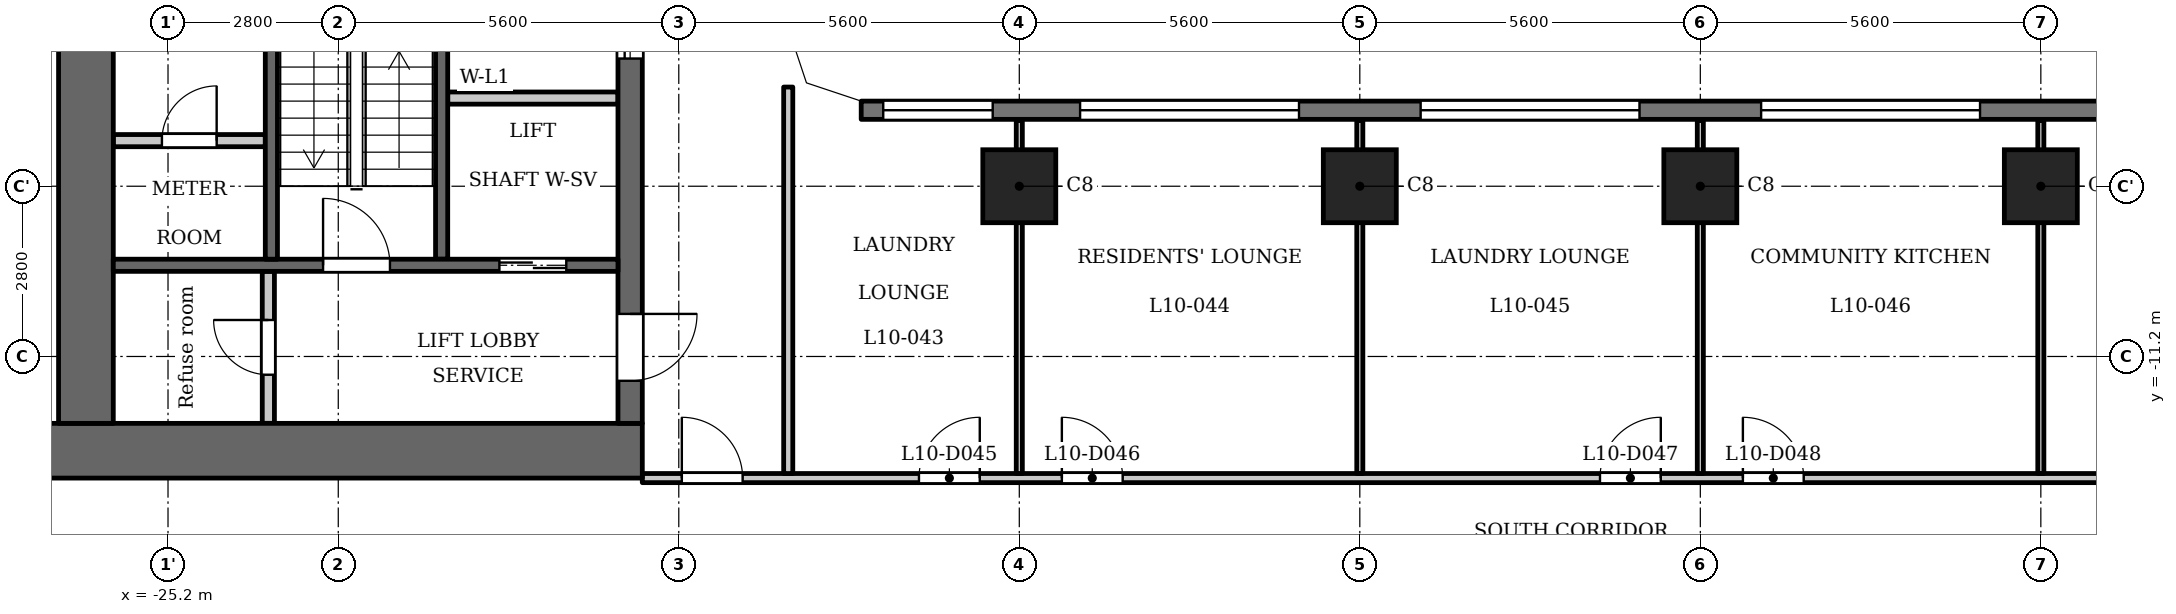
"""IFC4 building model, lengths in metres.
Left out: names, types, materials, properties, quantities, classifications, styles, units other than length and angle.
Written with IfcOpenShell. Run it as: python <this file> out.ifc"""

import sys

from ifc_helpers import new_model, si_unit, direction, frame, frame_2d, origin, origin_2d, place, context, subcontext, project, spatial, polyline, rectangle, outline, extrude, element, fill, save


model = new_model("IFC4")
c1 = context("Model", 3, precision=1e-05, world=origin(), true_north=direction((0.0, 1.0)))
c2 = subcontext(c1, "Body", "Model", "MODEL_VIEW")
j1 = project(units=[si_unit("LENGTHUNIT", "METRE"), si_unit("PLANEANGLEUNIT", "RADIAN")], contexts=[c1])
p1 = place(None, origin())
s1 = spatial("IfcSite", under=j1, at=p1, CompositionType="ELEMENT")
p2 = place(p1, origin())
s2 = spatial("IfcBuilding", under=s1, at=p2, CompositionType="ELEMENT")
p3 = place(p2, frame((0.0, 0.0, 44.5)))
s3 = spatial("IfcBuildingStorey", under=s2, at=p3, CompositionType="ELEMENT", Elevation=44.5)
for number, where, z_axis, x_axis in (
    (1, (-11.2, -8.4, 0.0), (0.0, 0.0, 1.0), (1.0, 0.0, 0.0)),
    (2, (-5.6, -8.4, 0.0), (0.0, 0.0, 1.0), (1.0, 0.0, 0.0)),
    (3, (0.0, -8.4, 0.0), (0.0, 0.0, 1.0), (1.0, 0.0, 0.0)),
    (4, (5.6, -8.4, 0.0), (0.0, 0.0, 1.0), (1.0, 0.0, 0.0)),
):
    element("IfcColumn", number, at=place(p3, frame(where, z_axis=z_axis, x_axis=x_axis)), inside=s3, PredefinedType="COLUMN", context=c2, shape_type="SweptSolid", body=[
        extrude(rectangle(XDim=1.2, YDim=1.2, at=origin_2d()), origin(), (0.0, 0.0, 1.0), 3.5),
    ])
p4 = place(p3, frame((13.8, -7.15, 0.0), z_axis=(0.0, 0.0, 1.0), x_axis=(-1.0, 0.0, 0.0)))
e5 = element("IfcWall", 5, at=p4, inside=s3, PredefinedType="SOLIDWALL", context=c2, shape_type="SweptSolid", body=[
    extrude(rectangle(XDim=27.6, YDim=0.3, at=frame_2d((13.8, 0.0))), origin(), (0.0, 0.0, 1.0), 3.2),
])
p5 = place(p4, frame((0.363, 0.0, 0.9)))
e6 = element("IfcOpeningElement", 6, at=p5, cuts=e5, PredefinedType="OPENING", context=c2, shape_type="SweptSolid", body=[
    extrude(rectangle(XDim=1.8, YDim=1.25, at=frame_2d((0.9, 0.625))), frame((0.0, 0.16, 0.0), z_axis=(0.0, -1.0, 0.0), x_axis=(1.0, 0.0, 0.0)), (0.0, 0.0, 1.0), 0.32),
])
p6 = place(p4, frame((3.6, 0.0, 1.2)))
e7 = element("IfcOpeningElement", 7, at=p6, cuts=e5, PredefinedType="OPENING", context=c2, shape_type="SweptSolid", body=[
    extrude(rectangle(XDim=3.6, YDim=0.95, at=frame_2d((1.8, 0.475))), frame((0.0, 0.16, 0.0), z_axis=(0.0, -1.0, 0.0), x_axis=(1.0, 0.0, 0.0)), (0.0, 0.0, 1.0), 0.32),
])
p7 = place(p4, frame((9.2, 0.0, 1.2)))
e8 = element("IfcOpeningElement", 8, at=p7, cuts=e5, PredefinedType="OPENING", context=c2, shape_type="SweptSolid", body=[
    extrude(rectangle(XDim=3.6, YDim=0.95, at=frame_2d((1.8, 0.475))), frame((0.0, 0.16, 0.0), z_axis=(0.0, -1.0, 0.0), x_axis=(1.0, 0.0, 0.0)), (0.0, 0.0, 1.0), 0.32),
])
p8 = place(p4, frame((14.8, 0.0, 1.2)))
e9 = element("IfcOpeningElement", 9, at=p8, cuts=e5, PredefinedType="OPENING", context=c2, shape_type="SweptSolid", body=[
    extrude(rectangle(XDim=3.6, YDim=0.95, at=frame_2d((1.8, 0.475))), frame((0.0, 0.16, 0.0), z_axis=(0.0, -1.0, 0.0), x_axis=(1.0, 0.0, 0.0)), (0.0, 0.0, 1.0), 0.32),
])
p9 = place(p4, frame((20.4, 0.0, 1.2)))
e10 = element("IfcOpeningElement", 10, at=p9, cuts=e5, PredefinedType="OPENING", context=c2, shape_type="SweptSolid", body=[
    extrude(rectangle(XDim=3.6, YDim=0.95, at=frame_2d((1.8, 0.475))), frame((0.0, 0.16, 0.0), z_axis=(0.0, -1.0, 0.0), x_axis=(1.0, 0.0, 0.0)), (0.0, 0.0, 1.0), 0.32),
])
p10 = place(p4, frame((25.438, 0.0, 0.9)))
e11 = element("IfcOpeningElement", 11, at=p10, cuts=e5, PredefinedType="OPENING", context=c2, shape_type="SweptSolid", body=[
    extrude(rectangle(XDim=1.8, YDim=1.25, at=frame_2d((0.9, 0.625))), frame((0.0, 0.16, 0.0), z_axis=(0.0, -1.0, 0.0), x_axis=(1.0, 0.0, 0.0)), (0.0, 0.0, 1.0), 0.32),
])
p11 = place(p3, frame((-20.7, -9.6, 0.0), z_axis=(0.0, 0.0, 1.0), x_axis=(0.0, 1.0, 0.0)))
e12 = element("IfcWall", 12, at=p11, inside=s3, PredefinedType="SHEAR", context=c2, shape_type="SweptSolid", body=[
    extrude(rectangle(XDim=9.75, YDim=0.2, at=frame_2d((4.875, 0.0))), origin(), (0.0, 0.0, 1.0), 3.2),
])
p12 = place(p3, frame((-17.4, -12.75, 0.0), z_axis=(0.0, 0.0, 1.0), x_axis=(-1.0, 0.0, 0.0)))
e13 = element("IfcWall", 13, at=p12, inside=s3, PredefinedType="SHEAR", context=c2, shape_type="SweptSolid", body=[
    extrude(rectangle(XDim=10.4, YDim=0.9, at=frame_2d((5.2, 0.0))), origin(), (0.0, 0.0, 1.0), 3.2),
])
p13 = place(p3, frame((-17.6, -12.3, 0.0), z_axis=(0.0, 0.0, 1.0), x_axis=(0.0, 1.0, 0.0)))
e14 = element("IfcWall", 14, at=p13, inside=s3, PredefinedType="SHEAR", context=c2, shape_type="SweptSolid", body=[
    extrude(rectangle(XDim=24.6, YDim=0.4, at=frame_2d((12.3, 0.0))), origin(), (0.0, 0.0, 1.0), 3.2),
])
p14 = place(p13, frame((6.0, 0.0, 0.0)))
e15 = element("IfcOpeningElement", 15, at=p14, cuts=e14, PredefinedType="OPENING", context=c2, shape_type="SweptSolid", body=[
    extrude(rectangle(XDim=1.1, YDim=2.1, at=frame_2d((0.55, 1.05))), frame((0.0, 0.21, 0.0), z_axis=(0.0, -1.0, 0.0), x_axis=(1.0, 0.0, 0.0)), (0.0, 0.0, 1.0), 0.42),
])
p15 = place(p13, frame((8.4, 0.0, 0.0)))
e16 = element("IfcOpeningElement", 16, at=p15, cuts=e14, PredefinedType="OPENING", context=c2, shape_type="SweptSolid", body=[
    extrude(rectangle(XDim=1.1, YDim=2.1, at=frame_2d((0.55, 1.05))), frame((0.0, 0.21, 0.0), z_axis=(0.0, -1.0, 0.0), x_axis=(1.0, 0.0, 0.0)), (0.0, 0.0, 1.0), 0.42),
])
p16 = place(p13, frame((10.8, 0.0, 0.0)))
e17 = element("IfcOpeningElement", 17, at=p16, cuts=e14, PredefinedType="OPENING", context=c2, shape_type="SweptSolid", body=[
    extrude(rectangle(XDim=1.1, YDim=2.1, at=frame_2d((0.55, 1.05))), frame((0.0, 0.21, 0.0), z_axis=(0.0, -1.0, 0.0), x_axis=(1.0, 0.0, 0.0)), (0.0, 0.0, 1.0), 0.42),
])
p17 = place(p13, frame((16.75, 0.0, 0.0)))
e18 = element("IfcOpeningElement", 18, at=p17, cuts=e14, PredefinedType="OPENING", context=c2, shape_type="SweptSolid", body=[
    extrude(rectangle(XDim=0.9, YDim=2.1, at=frame_2d((0.45, 1.05))), frame((0.0, 0.21, 0.0), z_axis=(0.0, -1.0, 0.0), x_axis=(1.0, 0.0, 0.0)), (0.0, 0.0, 1.0), 0.42),
])
p18 = place(p13, frame((22.8, 0.0, 0.0)))
e19 = element("IfcOpeningElement", 19, at=p18, cuts=e14, PredefinedType="OPENING", context=c2, shape_type="SweptSolid", body=[
    extrude(rectangle(XDim=1.1, YDim=2.1, at=frame_2d((0.55, 1.05))), frame((0.0, 0.21, 0.0), z_axis=(0.0, -1.0, 0.0), x_axis=(1.0, 0.0, 0.0)), (0.0, 0.0, 1.0), 0.42),
])
p19 = place(p13, frame((0.7, 0.0, 0.0)))
e20 = element("IfcOpeningElement", 20, at=p19, cuts=e14, PredefinedType="OPENING", context=c2, shape_type="SweptSolid", body=[
    extrude(rectangle(XDim=1.1, YDim=2.1, at=frame_2d((0.55, 1.05))), frame((0.0, 0.21, 0.0), z_axis=(0.0, -1.0, 0.0), x_axis=(1.0, 0.0, 0.0)), (0.0, 0.0, 1.0), 0.42),
])
p20 = place(p13, frame((12.775, 0.0, 0.0)))
e21 = element("IfcOpeningElement", 21, at=p20, cuts=e14, PredefinedType="OPENING", context=c2, shape_type="SweptSolid", body=[
    extrude(rectangle(XDim=1.8, YDim=2.1, at=frame_2d((0.9, 1.05))), frame((0.0, 0.21, 0.0), z_axis=(0.0, -1.0, 0.0), x_axis=(1.0, 0.0, 0.0)), (0.0, 0.0, 1.0), 0.42),
])
p21 = place(p3, frame((-26.55, -12.3, 0.0), z_axis=(0.0, 0.0, 1.0), x_axis=(0.0, 1.0, 0.0)))
e22 = element("IfcWall", 22, at=p21, inside=s3, PredefinedType="SHEAR", context=c2, shape_type="SweptSolid", body=[
    extrude(rectangle(XDim=24.6, YDim=0.9, at=frame_2d((12.3, 0.0))), origin(), (0.0, 0.0, 1.0), 3.2),
])
p22 = place(p3, frame((-23.55, -12.3, 0.0), z_axis=(0.0, 0.0, 1.0), x_axis=(0.0, 1.0, 0.0)))
e23 = element("IfcWall", 23, at=p22, inside=s3, PredefinedType="PARTITIONING", context=c2, shape_type="SweptSolid", body=[
    extrude(rectangle(XDim=2.5, YDim=0.2, at=frame_2d((1.25, 0.0))), origin(), (0.0, 0.0, 1.0), 3.2),
])
p23 = place(p22, frame((0.8, 0.0, 0.0)))
e24 = element("IfcOpeningElement", 24, at=p23, cuts=e23, PredefinedType="OPENING", context=c2, shape_type="SweptSolid", body=[
    extrude(rectangle(XDim=0.9, YDim=2.1, at=frame_2d((0.45, 1.05))), frame((0.0, 0.11, 0.0), z_axis=(0.0, -1.0, 0.0), x_axis=(1.0, 0.0, 0.0)), (0.0, 0.0, 1.0), 0.22),
])
p24 = place(p3, frame((-23.6, -7.65, 0.0), z_axis=(0.0, 0.0, 1.0), x_axis=(-1.0, 0.0, 0.0)))
e25 = element("IfcWall", 25, at=p24, inside=s3, PredefinedType="PARTITIONING", context=c2, shape_type="SweptSolid", body=[
    extrude(rectangle(XDim=2.5, YDim=0.2, at=frame_2d((1.25, 0.0))), origin(), (0.0, 0.0, 1.0), 3.2),
])
p25 = place(p24, frame((0.8, 0.0, 0.0)))
e26 = element("IfcOpeningElement", 26, at=p25, cuts=e25, PredefinedType="OPENING", context=c2, shape_type="SweptSolid", body=[
    extrude(rectangle(XDim=0.9, YDim=2.1, at=frame_2d((0.45, 1.05))), frame((0.0, 0.11, 0.0), z_axis=(0.0, -1.0, 0.0), x_axis=(1.0, 0.0, 0.0)), (0.0, 0.0, 1.0), 0.22),
])
p26 = place(p3, frame((-17.8, -9.7, 0.0), z_axis=(0.0, 0.0, 1.0), x_axis=(-1.0, 0.0, 0.0)))
e27 = element("IfcWall", 27, at=p26, inside=s3, PredefinedType="SHEAR", context=c2, shape_type="SweptSolid", body=[
    extrude(rectangle(XDim=8.3, YDim=0.2, at=frame_2d((4.15, 0.0))), origin(), (0.0, 0.0, 1.0), 3.2),
])
p27 = place(p26, frame((0.85, 0.0, 0.0)))
e28 = element("IfcOpeningElement", 28, at=p27, cuts=e27, PredefinedType="OPENING", context=c2, shape_type="SweptSolid", body=[
    extrude(rectangle(XDim=1.1, YDim=2.1, at=frame_2d((0.55, 1.05))), frame((0.0, 0.11, 0.0), z_axis=(0.0, -1.0, 0.0), x_axis=(1.0, 0.0, 0.0)), (0.0, 0.0, 1.0), 0.22),
])
p28 = place(p26, frame((3.75, 0.0, 0.0)))
e29 = element("IfcOpeningElement", 29, at=p28, cuts=e27, PredefinedType="OPENING", context=c2, shape_type="SweptSolid", body=[
    extrude(rectangle(XDim=1.1, YDim=2.1, at=frame_2d((0.55, 1.05))), frame((0.0, 0.11, 0.0), z_axis=(0.0, -1.0, 0.0), x_axis=(1.0, 0.0, 0.0)), (0.0, 0.0, 1.0), 0.22),
])
p29 = place(p3, frame((-17.8, -6.95, 0.0), z_axis=(0.0, 0.0, 1.0), x_axis=(-1.0, 0.0, 0.0)))
e30 = element("IfcWall", 30, at=p29, inside=s3, PredefinedType="PARTITIONING", context=c2, shape_type="SweptSolid", body=[
    extrude(rectangle(XDim=2.8, YDim=0.2, at=frame_2d((1.4, 0.0))), origin(), (0.0, 0.0, 1.0), 3.2),
])
p30 = place(p3, frame((-23.5, -9.6, 0.0), z_axis=(0.0, 0.0, 1.0), x_axis=(0.0, 1.0, 0.0)))
e31 = element("IfcWall", 31, at=p30, inside=s3, PredefinedType="SHEAR", context=c2, shape_type="SweptSolid", body=[
    extrude(rectangle(XDim=6.9, YDim=0.2, at=frame_2d((3.45, 0.0))), origin(), (0.0, 0.0, 1.0), 3.2),
])
p31 = place(p3, frame((-17.4, -13.2, 0.0), z_axis=(0.0, 0.0, 1.0), x_axis=(1.0, 0.0, 0.0)))
e32 = element("IfcWall", 32, at=p31, inside=s3, PredefinedType="PARTITIONING", context=c2, shape_type="SweptSolid", body=[
    extrude(rectangle(XDim=34.8, YDim=0.15, at=frame_2d((17.4, 0.0))), origin(), (0.0, 0.0, 1.0), 3.2),
])
p32 = place(p31, frame((0.65, 0.0, 0.0)))
e33 = element("IfcOpeningElement", 33, at=p32, cuts=e32, PredefinedType="OPENING", context=c2, shape_type="SweptSolid", body=[
    extrude(rectangle(XDim=1.0, YDim=2.1, at=frame_2d((0.5, 1.05))), frame((0.0, 0.085, 0.0), z_axis=(0.0, -1.0, 0.0), x_axis=(1.0, 0.0, 0.0)), (0.0, 0.0, 1.0), 0.17),
])
p33 = place(p31, frame((33.05, 0.0, 0.0)))
e34 = element("IfcOpeningElement", 34, at=p33, cuts=e32, PredefinedType="OPENING", context=c2, shape_type="SweptSolid", body=[
    extrude(rectangle(XDim=1.0, YDim=2.1, at=frame_2d((0.5, 1.05))), frame((0.0, 0.085, 0.0), z_axis=(0.0, -1.0, 0.0), x_axis=(1.0, 0.0, 0.0)), (0.0, 0.0, 1.0), 0.17),
])
p34 = place(p31, frame((4.55, 0.0, 0.0)))
e35 = element("IfcOpeningElement", 35, at=p34, cuts=e32, PredefinedType="OPENING", context=c2, shape_type="SweptSolid", body=[
    extrude(rectangle(XDim=1.0, YDim=2.1, at=frame_2d((0.5, 1.05))), frame((0.0, 0.085, 0.0), z_axis=(0.0, -1.0, 0.0), x_axis=(1.0, 0.0, 0.0)), (0.0, 0.0, 1.0), 0.17),
])
p35 = place(p31, frame((6.9, 0.0, 0.0)))
e36 = element("IfcOpeningElement", 36, at=p35, cuts=e32, PredefinedType="OPENING", context=c2, shape_type="SweptSolid", body=[
    extrude(rectangle(XDim=1.0, YDim=2.1, at=frame_2d((0.5, 1.05))), frame((0.0, 0.085, 0.0), z_axis=(0.0, -1.0, 0.0), x_axis=(1.0, 0.0, 0.0)), (0.0, 0.0, 1.0), 0.17),
])
p36 = place(p31, frame((15.75, 0.0, 0.0)))
e37 = element("IfcOpeningElement", 37, at=p36, cuts=e32, PredefinedType="OPENING", context=c2, shape_type="SweptSolid", body=[
    extrude(rectangle(XDim=1.0, YDim=2.1, at=frame_2d((0.5, 1.05))), frame((0.0, 0.085, 0.0), z_axis=(0.0, -1.0, 0.0), x_axis=(1.0, 0.0, 0.0)), (0.0, 0.0, 1.0), 0.17),
])
p37 = place(p31, frame((18.1, 0.0, 0.0)))
e38 = element("IfcOpeningElement", 38, at=p37, cuts=e32, PredefinedType="OPENING", context=c2, shape_type="SweptSolid", body=[
    extrude(rectangle(XDim=1.0, YDim=2.1, at=frame_2d((0.5, 1.05))), frame((0.0, 0.085, 0.0), z_axis=(0.0, -1.0, 0.0), x_axis=(1.0, 0.0, 0.0)), (0.0, 0.0, 1.0), 0.17),
])
p38 = place(p31, frame((26.95, 0.0, 0.0)))
e39 = element("IfcOpeningElement", 39, at=p38, cuts=e32, PredefinedType="OPENING", context=c2, shape_type="SweptSolid", body=[
    extrude(rectangle(XDim=1.0, YDim=2.1, at=frame_2d((0.5, 1.05))), frame((0.0, 0.085, 0.0), z_axis=(0.0, -1.0, 0.0), x_axis=(1.0, 0.0, 0.0)), (0.0, 0.0, 1.0), 0.17),
])
p39 = place(p31, frame((29.25, 0.0, 0.0)))
e40 = element("IfcOpeningElement", 40, at=p39, cuts=e32, PredefinedType="OPENING", context=c2, shape_type="SweptSolid", body=[
    extrude(rectangle(XDim=1.0, YDim=2.1, at=frame_2d((0.5, 1.05))), frame((0.0, 0.085, 0.0), z_axis=(0.0, -1.0, 0.0), x_axis=(1.0, 0.0, 0.0)), (0.0, 0.0, 1.0), 0.17),
])
p40 = place(p3, frame((-15.0, -13.125, 0.0), z_axis=(0.0, 0.0, 1.0), x_axis=(0.0, 1.0, 0.0)))
e41 = element("IfcWall", 41, at=p40, inside=s3, PredefinedType="PARTITIONING", context=c2, shape_type="SweptSolid", body=[
    extrude(rectangle(XDim=6.356, YDim=0.15, at=frame_2d((3.178, 0.0))), origin(), (0.0, 0.0, 1.0), 3.2),
])
for number, where, z_axis, x_axis in (
    (42, (-11.2, -13.125, 0.0), (0.0, 0.0, 1.0), (0.0, 1.0, 0.0)),
    (43, (-5.6, -13.125, 0.0), (0.0, 0.0, 1.0), (0.0, 1.0, 0.0)),
    (44, (0.0, -13.125, 0.0), (0.0, 0.0, 1.0), (0.0, 1.0, 0.0)),
    (45, (5.6, -13.125, 0.0), (0.0, 0.0, 1.0), (0.0, 1.0, 0.0)),
):
    element("IfcWall", number, at=place(p3, frame(where, z_axis=z_axis, x_axis=x_axis)), inside=s3, PredefinedType="PARTITIONING", context=c2, shape_type="SweptSolid", body=[
        extrude(rectangle(XDim=5.805, YDim=0.1, at=frame_2d((2.902, 0.0))), origin(), (0.0, 0.0, 1.0), 3.2),
    ])
p41 = place(p3, origin())
e46 = element("IfcWall", 46, at=p41, inside=s3, PredefinedType="SOLIDWALL", context=c2, shape_type="SweptSolid", body=[
    extrude(outline(polyline([(-14.937, -6.937), (-13.849, -7.3), (-13.8, -7.3), (-13.8, -7.0), (-14.7, -6.7), (-15.0, -5.8), (-15.3, -5.8), (-15.3, -5.849), (-14.937, -6.937)])), origin(), (0.0, 0.0, 1.0), 3.2),
])
p42 = place(p27, origin())
e47 = element("IfcDoor", 47, at=p42, inside=s3, OperationType="DOUBLE_DOOR_SLIDING", PredefinedType="DOOR", context=c2, shape_type="SweptSolid", body=[
    extrude(rectangle(XDim=1.1, YDim=2.1, at=frame_2d((0.55, 1.05))), frame((0.0, 0.025, 0.0), z_axis=(0.0, -1.0, 0.0), x_axis=(1.0, 0.0, 0.0)), (0.0, 0.0, 1.0), 0.05),
])
fill(e28, e47)
p43 = place(p14, origin())
e48 = element("IfcDoor", 48, at=p43, inside=s3, OperationType="DOUBLE_DOOR_SLIDING", PredefinedType="DOOR", context=c2, shape_type="SweptSolid", body=[
    extrude(rectangle(XDim=1.1, YDim=2.1, at=frame_2d((0.55, 1.05))), frame((0.0, 0.025, 0.0), z_axis=(0.0, -1.0, 0.0), x_axis=(1.0, 0.0, 0.0)), (0.0, 0.0, 1.0), 0.05),
])
fill(e15, e48)
p44 = place(p19, origin())
e49 = element("IfcDoor", 49, at=p44, inside=s3, OperationType="SINGLE_SWING_RIGHT", PredefinedType="DOOR", context=c2, shape_type="SweptSolid", body=[
    extrude(rectangle(XDim=1.1, YDim=2.1, at=frame_2d((0.55, 1.05))), frame((0.0, 0.025, 0.0), z_axis=(0.0, -1.0, 0.0), x_axis=(1.0, 0.0, 0.0)), (0.0, 0.0, 1.0), 0.05),
])
fill(e20, e49)
p45 = place(p23, origin())
e50 = element("IfcDoor", 50, at=p45, inside=s3, OperationType="SINGLE_SWING_LEFT", PredefinedType="DOOR", context=c2, shape_type="SweptSolid", body=[
    extrude(rectangle(XDim=0.9, YDim=2.1, at=frame_2d((0.45, 1.05))), frame((0.0, 0.025, 0.0), z_axis=(0.0, -1.0, 0.0), x_axis=(1.0, 0.0, 0.0)), (0.0, 0.0, 1.0), 0.05),
])
fill(e24, e50)
p46 = place(p28, origin())
e51 = element("IfcDoor", 51, at=p46, inside=s3, OperationType="SINGLE_SWING_RIGHT", PredefinedType="DOOR", context=c2, shape_type="SweptSolid", body=[
    extrude(rectangle(XDim=1.1, YDim=2.1, at=frame_2d((0.55, 1.05))), frame((0.0, 0.025, 0.0), z_axis=(0.0, -1.0, 0.0), x_axis=(1.0, 0.0, 0.0)), (0.0, 0.0, 1.0), 0.05),
])
fill(e29, e51)
p47 = place(p25, origin())
e52 = element("IfcDoor", 52, at=p47, inside=s3, OperationType="SINGLE_SWING_LEFT", PredefinedType="DOOR", context=c2, shape_type="SweptSolid", body=[
    extrude(rectangle(XDim=0.9, YDim=2.1, at=frame_2d((0.45, 1.05))), frame((0.0, 0.025, 0.0), z_axis=(0.0, -1.0, 0.0), x_axis=(1.0, 0.0, 0.0)), (0.0, 0.0, 1.0), 0.05),
])
fill(e26, e52)
p48 = place(p32, origin())
e53 = element("IfcDoor", 53, at=p48, inside=s3, OperationType="SINGLE_SWING_RIGHT", PredefinedType="DOOR", context=c2, shape_type="SweptSolid", body=[
    extrude(rectangle(XDim=1.0, YDim=2.1, at=frame_2d((0.5, 1.05))), frame((0.0, 0.025, 0.0), z_axis=(0.0, -1.0, 0.0), x_axis=(1.0, 0.0, 0.0)), (0.0, 0.0, 1.0), 0.05),
])
fill(e33, e53)
p49 = place(p34, origin())
e54 = element("IfcDoor", 54, at=p49, inside=s3, OperationType="SINGLE_SWING_LEFT", PredefinedType="DOOR", context=c2, shape_type="SweptSolid", body=[
    extrude(rectangle(XDim=1.0, YDim=2.1, at=frame_2d((0.5, 1.05))), frame((0.0, 0.025, 0.0), z_axis=(0.0, -1.0, 0.0), x_axis=(1.0, 0.0, 0.0)), (0.0, 0.0, 1.0), 0.05),
])
fill(e35, e54)
p50 = place(p35, origin())
e55 = element("IfcDoor", 55, at=p50, inside=s3, OperationType="SINGLE_SWING_RIGHT", PredefinedType="DOOR", context=c2, shape_type="SweptSolid", body=[
    extrude(rectangle(XDim=1.0, YDim=2.1, at=frame_2d((0.5, 1.05))), frame((0.0, 0.025, 0.0), z_axis=(0.0, -1.0, 0.0), x_axis=(1.0, 0.0, 0.0)), (0.0, 0.0, 1.0), 0.05),
])
fill(e36, e55)
p51 = place(p36, origin())
e56 = element("IfcDoor", 56, at=p51, inside=s3, OperationType="SINGLE_SWING_LEFT", PredefinedType="DOOR", context=c2, shape_type="SweptSolid", body=[
    extrude(rectangle(XDim=1.0, YDim=2.1, at=frame_2d((0.5, 1.05))), frame((0.0, 0.025, 0.0), z_axis=(0.0, -1.0, 0.0), x_axis=(1.0, 0.0, 0.0)), (0.0, 0.0, 1.0), 0.05),
])
fill(e37, e56)
p52 = place(p37, origin())
e57 = element("IfcDoor", 57, at=p52, inside=s3, OperationType="SINGLE_SWING_RIGHT", PredefinedType="DOOR", context=c2, shape_type="SweptSolid", body=[
    extrude(rectangle(XDim=1.0, YDim=2.1, at=frame_2d((0.5, 1.05))), frame((0.0, 0.025, 0.0), z_axis=(0.0, -1.0, 0.0), x_axis=(1.0, 0.0, 0.0)), (0.0, 0.0, 1.0), 0.05),
])
fill(e38, e57)
p53 = place(p7, origin())
e58 = element("IfcWindow", 58, at=p53, inside=s3, PartitioningType="SINGLE_PANEL", PredefinedType="WINDOW", context=c2, shape_type="SweptSolid", body=[
    extrude(rectangle(XDim=3.6, YDim=0.95, at=frame_2d((1.8, 0.475))), frame((0.0, 0.03, 0.0), z_axis=(0.0, -1.0, 0.0), x_axis=(1.0, 0.0, 0.0)), (0.0, 0.0, 1.0), 0.06),
])
fill(e8, e58)
p54 = place(p8, origin())
e59 = element("IfcWindow", 59, at=p54, inside=s3, PartitioningType="SINGLE_PANEL", PredefinedType="WINDOW", context=c2, shape_type="SweptSolid", body=[
    extrude(rectangle(XDim=3.6, YDim=0.95, at=frame_2d((1.8, 0.475))), frame((0.0, 0.03, 0.0), z_axis=(0.0, -1.0, 0.0), x_axis=(1.0, 0.0, 0.0)), (0.0, 0.0, 1.0), 0.06),
])
fill(e9, e59)
p55 = place(p9, origin())
e60 = element("IfcWindow", 60, at=p55, inside=s3, PartitioningType="SINGLE_PANEL", PredefinedType="WINDOW", context=c2, shape_type="SweptSolid", body=[
    extrude(rectangle(XDim=3.6, YDim=0.95, at=frame_2d((1.8, 0.475))), frame((0.0, 0.03, 0.0), z_axis=(0.0, -1.0, 0.0), x_axis=(1.0, 0.0, 0.0)), (0.0, 0.0, 1.0), 0.06),
])
fill(e10, e60)
p56 = place(p10, origin())
e61 = element("IfcWindow", 61, at=p56, inside=s3, PartitioningType="SINGLE_PANEL", PredefinedType="WINDOW", context=c2, shape_type="SweptSolid", body=[
    extrude(rectangle(XDim=1.8, YDim=1.25, at=frame_2d((0.9, 0.625))), frame((0.0, 0.03, 0.0), z_axis=(0.0, -1.0, 0.0), x_axis=(1.0, 0.0, 0.0)), (0.0, 0.0, 1.0), 0.06),
])
fill(e11, e61)
save(model, sys.argv[1])
